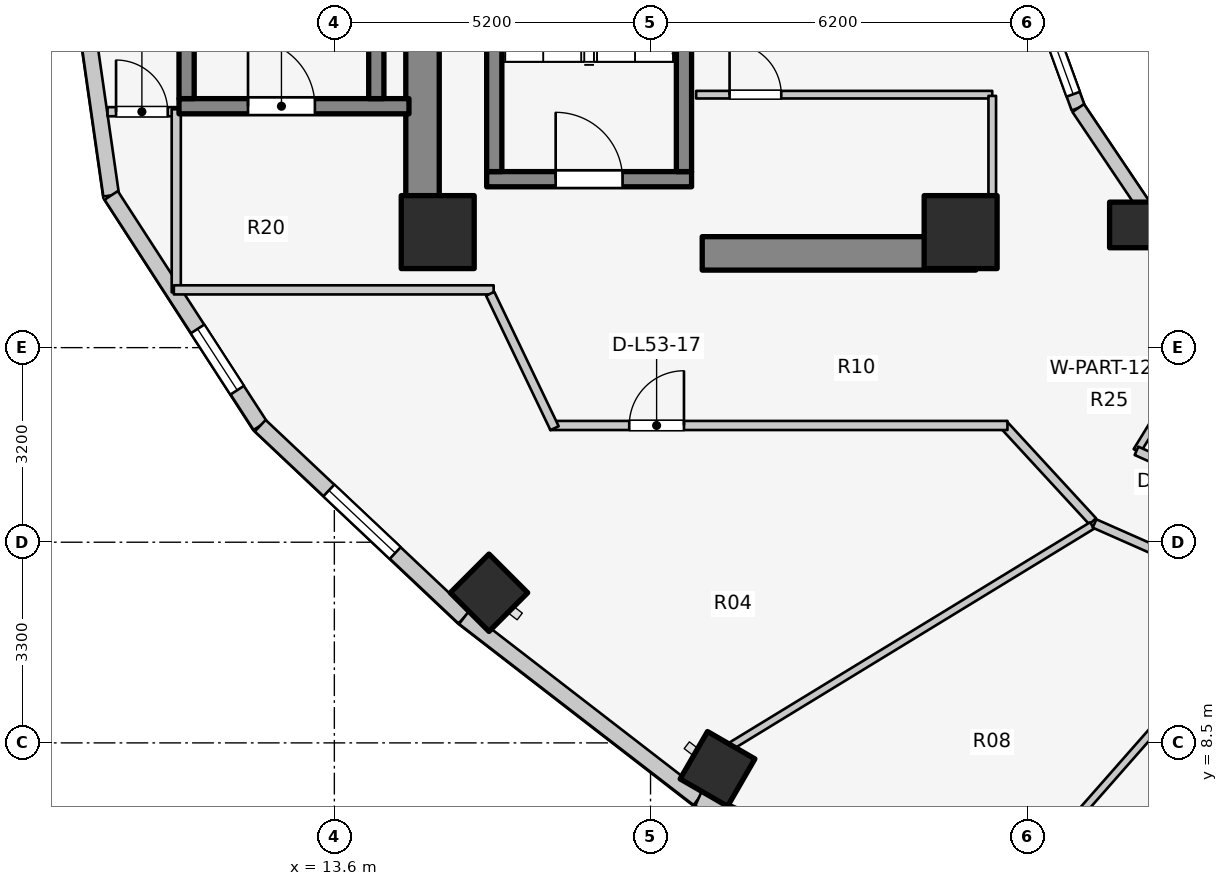
"""IFC4 building model, lengths in metres.
Left out: names, types, materials, properties, quantities, classifications, styles, units other than length and angle.
Written with IfcOpenShell. Run it as: python <this file> out.ifc"""

import sys

from ifc_helpers import new_model, si_unit, direction, frame, frame_2d, origin, origin_2d, place, context, subcontext, project, spatial, rectangle, extrude, element, fill, save


model = new_model("IFC4")
c1 = context("Model", 3, precision=1e-05, world=origin(), true_north=direction((0.0, 1.0)))
c2 = subcontext(c1, "Body", "Model", "MODEL_VIEW")
j1 = project(units=[si_unit("LENGTHUNIT", "METRE"), si_unit("PLANEANGLEUNIT", "RADIAN")], contexts=[c1])
p1 = place(None, origin())
s1 = spatial("IfcSite", under=j1, at=p1, CompositionType="ELEMENT")
p2 = place(p1, origin())
s2 = spatial("IfcBuilding", under=s1, at=p2, CompositionType="ELEMENT")
p3 = place(p2, frame((0.0, 0.0, 174.6)))
s3 = spatial("IfcBuildingStorey", under=s2, at=p3, CompositionType="ELEMENT", Elevation=174.6)
p4 = place(p3, frame((15.05, 17.05, 0.0), z_axis=(0.0, 0.0, 1.0), x_axis=(0.0, 1.0, 0.0)))
e1 = element("IfcWall", 1, at=p4, inside=s3, PredefinedType="SHEAR", context=c2, shape_type="SweptSolid", body=[
    extrude(rectangle(XDim=12.8, YDim=0.55, at=frame_2d((6.4, 0.0))), origin(), (0.0, 0.0, 1.0), 3.1),
])
p5 = place(p3, frame((19.65, 16.55, 0.0), z_axis=(0.0, 0.0, 1.0), x_axis=(1.0, 0.0, 0.0)))
e2 = element("IfcWall", 2, at=p5, inside=s3, PredefinedType="SHEAR", context=c2, shape_type="SweptSolid", body=[
    extrude(rectangle(XDim=4.5, YDim=0.55, at=frame_2d((2.25, 0.0))), origin(), (0.0, 0.0, 1.0), 3.1),
])
p6 = place(p3, frame((16.105, 17.77, 0.0), z_axis=(0.0, 0.0, 1.0), x_axis=(1.0, 0.0, 0.0)))
e3 = element("IfcWall", 3, at=p6, inside=s3, PredefinedType="SOLIDWALL", context=c2, shape_type="SweptSolid", body=[
    extrude(rectangle(XDim=3.37, YDim=0.25, at=frame_2d((1.685, 0.0))), origin(), (0.0, 0.0, 1.0), 3.1),
])
p7 = place(p6, frame((1.135, 0.0, 0.0)))
e4 = element("IfcOpeningElement", 4, at=p7, cuts=e3, PredefinedType="OPENING", context=c2, shape_type="SweptSolid", body=[
    extrude(rectangle(XDim=1.1, YDim=2.1, at=frame_2d((0.55, 1.05))), frame((0.0, 0.135, 0.0), z_axis=(0.0, -1.0, 0.0), x_axis=(1.0, 0.0, 0.0)), (0.0, 0.0, 1.0), 0.27),
])
for number, where, z_axis, x_axis in (
    (5, (16.23, 17.895, 0.0), (0.0, 0.0, 1.0), (0.0, 1.0, 0.0)),
    (6, (19.35, 17.895, 0.0), (0.0, 0.0, 1.0), (0.0, 1.0, 0.0)),
):
    element("IfcWall", number, at=place(p3, frame(where, z_axis=z_axis, x_axis=x_axis)), inside=s3, PredefinedType="SOLIDWALL", context=c2, shape_type="SweptSolid", body=[
        extrude(rectangle(XDim=7.81, YDim=0.25, at=frame_2d((3.905, 0.0))), origin(), (0.0, 0.0, 1.0), 3.1),
    ])
p8 = place(p3, frame((11.045, 18.97, 0.0), z_axis=(0.0, 0.0, 1.0), x_axis=(1.0, 0.0, 0.0)))
e7 = element("IfcWall", 7, at=p8, inside=s3, PredefinedType="SOLIDWALL", context=c2, shape_type="SweptSolid", body=[
    extrude(rectangle(XDim=3.782, YDim=0.25, at=frame_2d((1.891, 0.0))), origin(), (0.0, 0.0, 1.0), 3.1),
])
p9 = place(p8, frame((1.135, 0.0, 0.0)))
e8 = element("IfcOpeningElement", 8, at=p9, cuts=e7, PredefinedType="OPENING", context=c2, shape_type="SweptSolid", body=[
    extrude(rectangle(XDim=1.1, YDim=2.1, at=frame_2d((0.55, 1.05))), frame((0.0, 0.135, 0.0), z_axis=(0.0, -1.0, 0.0), x_axis=(1.0, 0.0, 0.0)), (0.0, 0.0, 1.0), 0.27),
])
for number, where, z_axis, x_axis in (
    (9, (11.17, 19.095, 0.0), (0.0, 0.0, 1.0), (0.0, 1.0, 0.0)),
    (10, (14.29, 19.095, 0.0), (0.0, 0.0, 1.0), (0.0, 1.0, 0.0)),
):
    element("IfcWall", number, at=place(p3, frame(where, z_axis=z_axis, x_axis=x_axis)), inside=s3, PredefinedType="SOLIDWALL", context=c2, shape_type="SweptSolid", body=[
        extrude(rectangle(XDim=7.81, YDim=0.25, at=frame_2d((3.905, 0.0))), origin(), (0.0, 0.0, 1.0), 3.1),
    ])
for number, where, z_axis, x_axis in (
    (11, (15.3, 16.9, 0.0), (0.0, 0.0, 1.0), (1.0, 0.0, 0.0)),
    (12, (23.9, 16.9, 0.0), (0.0, 0.0, 1.0), (1.0, 0.0, 0.0)),
):
    element("IfcColumn", number, at=place(p3, frame(where, z_axis=z_axis, x_axis=x_axis)), inside=s3, PredefinedType="COLUMN", context=c2, shape_type="SweptSolid", body=[
        extrude(rectangle(XDim=1.2, YDim=1.2, at=origin_2d()), origin(), (0.0, 0.0, 1.0), 3.1),
    ])
p10 = place(p3, frame((26.725, 17.018, 0.0), z_axis=(0.0, 0.0, 1.0), x_axis=(1.0, 0.0, 0.0)))
e13 = element("IfcColumn", 13, at=p10, inside=s3, PredefinedType="COLUMN", context=c2, shape_type="SweptSolid", body=[
    extrude(rectangle(XDim=0.75, YDim=0.75, at=origin_2d()), origin(), (0.0, 0.0, 1.0), 3.1),
])
for number, where, z_axis, x_axis in (
    (14, (16.143, 10.969, 0.0), (0.0, 0.0, 1.0), (-0.707, -0.707, 0.0)),
    (15, (19.902, 8.072, 0.0), (0.0, 0.0, 1.0), (-0.5, -0.866, 0.0)),
):
    element("IfcColumn", number, at=place(p3, frame(where, z_axis=z_axis, x_axis=x_axis)), inside=s3, PredefinedType="COLUMN", context=c2, shape_type="SweptSolid", body=[
        extrude(rectangle(XDim=0.9, YDim=0.9, at=origin_2d()), origin(), (0.0, 0.0, 1.0), 3.1),
    ])
p11 = place(p3, frame((25.123, 20.898, 0.0), z_axis=(0.0, 0.0, 1.0), x_axis=(0.341423187295, -0.93990968033, 0.0)))
e16 = element("IfcWall", 16, at=p11, inside=s3, PredefinedType="STANDARD", context=c2, shape_type="SweptSolid", body=[
    extrude(rectangle(XDim=2.084, YDim=0.23, at=frame_2d((1.042, 0.0))), origin(), (0.0, 0.0, 1.0), 2.84),
])
p12 = place(p11, frame((0.242, 0.0, 0.85)))
e17 = element("IfcOpeningElement", 17, at=p12, cuts=e16, PredefinedType="OPENING", context=c2, shape_type="SweptSolid", body=[
    extrude(rectangle(XDim=1.6, YDim=1.65, at=frame_2d((0.8, 0.825))), frame((0.0, 0.125, 0.0), z_axis=(0.0, -1.0, 0.0), x_axis=(1.0, 0.0, 0.0)), (0.0, 0.0, 1.0), 0.25),
])
p13 = place(p3, frame((25.834, 18.94, 0.0), z_axis=(0.0, 0.0, 1.0), x_axis=(0.558197800898, -0.829707909492, 0.0)))
e18 = element("IfcWall", 18, at=p13, inside=s3, PredefinedType="STANDARD", context=c2, shape_type="SweptSolid", body=[
    extrude(rectangle(XDim=2.027, YDim=0.23, at=frame_2d((1.013, 0.0))), origin(), (0.0, 0.0, 1.0), 2.16),
])
p14 = place(p3, frame((26.965, 17.258, 0.0), z_axis=(0.0, 0.0, 1.0), x_axis=(0.752576694707, -0.658504607869, 0.0)))
e19 = element("IfcWall", 19, at=p14, inside=s3, PredefinedType="STANDARD", context=c2, shape_type="SweptSolid", body=[
    extrude(rectangle(XDim=1.959, YDim=0.23, at=frame_2d((0.98, 0.0))), origin(), (0.0, 0.0, 1.0), 2.16),
])
p15 = place(p3, frame((9.14, 23.0, 0.0), z_axis=(0.0, 0.0, 1.0), x_axis=(0.142227632286, -0.989833976288, 0.0)))
e20 = element("IfcWall", 20, at=p15, inside=s3, PredefinedType="STANDARD", context=c2, shape_type="SweptSolid", body=[
    extrude(rectangle(XDim=5.553, YDim=0.26, at=frame_2d((2.776, 0.0))), origin(), (0.0, 0.0, 1.0), 2.85),
])
p16 = place(p15, frame((1.506, 0.0, 0.75)))
e21 = element("IfcOpeningElement", 21, at=p16, cuts=e20, PredefinedType="OPENING", context=c2, shape_type="SweptSolid", body=[
    extrude(rectangle(XDim=1.2, YDim=1.5, at=frame_2d((0.6, 0.75))), frame((0.0, 0.14, 0.0), z_axis=(0.0, -1.0, 0.0), x_axis=(1.0, 0.0, 0.0)), (0.0, 0.0, 1.0), 0.28),
])
p17 = place(p3, frame((9.93, 17.503, 0.0), z_axis=(0.0, 0.0, 1.0), x_axis=(0.543358984534, -0.839500454989, 0.0)))
e22 = element("IfcWall", 22, at=p17, inside=s3, PredefinedType="STANDARD", context=c2, shape_type="SweptSolid", body=[
    extrude(rectangle(XDim=4.511, YDim=0.26, at=frame_2d((2.256, 0.0))), origin(), (0.0, 0.0, 1.0), 2.85),
])
p18 = place(p17, frame((2.615, 0.0, 0.75)))
e23 = element("IfcOpeningElement", 23, at=p18, cuts=e22, PredefinedType="OPENING", context=c2, shape_type="SweptSolid", body=[
    extrude(rectangle(XDim=1.2, YDim=1.5, at=frame_2d((0.6, 0.75))), frame((0.0, 0.14, 0.0), z_axis=(0.0, -1.0, 0.0), x_axis=(1.0, 0.0, 0.0)), (0.0, 0.0, 1.0), 0.28),
])
p19 = place(p3, frame((12.381, 13.716, 0.0), z_axis=(0.0, 0.0, 1.0), x_axis=(0.727667301037, -0.68593024354, 0.0)))
e24 = element("IfcWall", 24, at=p19, inside=s3, PredefinedType="STANDARD", context=c2, shape_type="SweptSolid", body=[
    extrude(rectangle(XDim=4.604, YDim=0.26, at=frame_2d((2.302, 0.0))), origin(), (0.0, 0.0, 1.0), 2.85),
])
p20 = place(p19, frame((1.552, 0.0, 0.75)))
e25 = element("IfcOpeningElement", 25, at=p20, cuts=e24, PredefinedType="OPENING", context=c2, shape_type="SweptSolid", body=[
    extrude(rectangle(XDim=1.5, YDim=1.6, at=frame_2d((0.75, 0.8))), frame((0.0, 0.14, 0.0), z_axis=(0.0, -1.0, 0.0), x_axis=(1.0, 0.0, 0.0)), (0.0, 0.0, 1.0), 0.28),
])
p21 = place(p3, frame((15.731, 10.559, 0.0), z_axis=(0.0, 0.0, 1.0), x_axis=(0.791460185804, -0.611220724687, 0.0)))
e26 = element("IfcWall", 26, at=p21, inside=s3, PredefinedType="STANDARD", context=c2, shape_type="SweptSolid", body=[
    extrude(rectangle(XDim=4.872, YDim=0.26, at=frame_2d((2.436, 0.0))), origin(), (0.0, 0.0, 1.0), 2.85),
])
p22 = place(p3, frame((19.587, 7.581, 0.0), z_axis=(0.0, 0.0, 1.0), x_axis=(0.912353637112, -0.409403029847, 0.0)))
e27 = element("IfcWall", 27, at=p22, inside=s3, PredefinedType="STANDARD", context=c2, shape_type="SweptSolid", body=[
    extrude(rectangle(XDim=5.533, YDim=0.26, at=frame_2d((2.766, 0.0))), origin(), (0.0, 0.0, 1.0), 2.85),
])
p23 = place(p22, frame((1.566, 0.0, 0.75)))
e28 = element("IfcOpeningElement", 28, at=p23, cuts=e27, PredefinedType="OPENING", context=c2, shape_type="SweptSolid", body=[
    extrude(rectangle(XDim=2.4, YDim=1.7, at=frame_2d((1.2, 0.85))), frame((0.0, 0.14, 0.0), z_axis=(0.0, -1.0, 0.0), x_axis=(1.0, 0.0, 0.0)), (0.0, 0.0, 1.0), 0.28),
])
p24 = place(p3, frame((19.55, 19.16, 0.0), z_axis=(0.0, 0.0, 1.0), x_axis=(1.0, 0.0, 0.0)))
e29 = element("IfcWall", 29, at=p24, inside=s3, PredefinedType="PARTITIONING", context=c2, shape_type="SweptSolid", body=[
    extrude(rectangle(XDim=4.87, YDim=0.125, at=frame_2d((2.435, 0.0))), origin(), (0.0, 0.0, 1.0), 2.12),
])
p25 = place(p24, frame((0.55, 0.0, 0.0)))
e30 = element("IfcOpeningElement", 30, at=p25, cuts=e29, PredefinedType="OPENING", context=c2, shape_type="SweptSolid", body=[
    extrude(rectangle(XDim=0.85, YDim=2.05, at=frame_2d((0.425, 1.025))), frame((0.0, 0.073, 0.0), z_axis=(0.0, -1.0, 0.0), x_axis=(1.0, 0.0, 0.0)), (0.0, 0.0, 1.0), 0.145),
])
p26 = place(p3, frame((24.42, 17.1, 0.0), z_axis=(0.0, 0.0, 1.0), x_axis=(0.0, 1.0, 0.0)))
e31 = element("IfcWall", 31, at=p26, inside=s3, PredefinedType="PARTITIONING", context=c2, shape_type="SweptSolid", body=[
    extrude(rectangle(XDim=2.04, YDim=0.125, at=frame_2d((1.02, 0.0))), origin(), (0.0, 0.0, 1.0), 2.232),
])
p27 = place(p3, frame((9.87, 18.88, 0.0), z_axis=(0.0, 0.0, 1.0), x_axis=(1.0, 0.0, 0.0)))
e32 = element("IfcWall", 32, at=p27, inside=s3, PredefinedType="PARTITIONING", context=c2, shape_type="SweptSolid", body=[
    extrude(rectangle(XDim=1.17, YDim=0.15, at=frame_2d((0.585, 0.0))), origin(), (0.0, 0.0, 1.0), 2.855),
])
p28 = place(p27, frame((0.14, 0.0, 0.0)))
e33 = element("IfcOpeningElement", 33, at=p28, cuts=e32, PredefinedType="OPENING", context=c2, shape_type="SweptSolid", body=[
    extrude(rectangle(XDim=0.85, YDim=2.05, at=frame_2d((0.425, 1.025))), frame((0.0, 0.085, 0.0), z_axis=(0.0, -1.0, 0.0), x_axis=(1.0, 0.0, 0.0)), (0.0, 0.0, 1.0), 0.17),
])
p29 = place(p3, frame((11.0, 15.91, 0.0), z_axis=(0.0, 0.0, 1.0), x_axis=(0.0, 1.0, 0.0)))
e34 = element("IfcWall", 34, at=p29, inside=s3, PredefinedType="PARTITIONING", context=c2, shape_type="SweptSolid", body=[
    extrude(rectangle(XDim=3.01, YDim=0.15, at=frame_2d((1.505, 0.0))), origin(), (0.0, 0.0, 1.0), 2.855),
])
p30 = place(p3, frame((10.96, 15.95, 0.0), z_axis=(0.0, 0.0, 1.0), x_axis=(1.0, 0.0, 0.0)))
e35 = element("IfcWall", 35, at=p30, inside=s3, PredefinedType="PARTITIONING", context=c2, shape_type="SweptSolid", body=[
    extrude(rectangle(XDim=5.26, YDim=0.15, at=frame_2d((2.63, 0.0))), origin(), (0.0, 0.0, 1.0), 2.22),
])
p31 = place(p3, frame((26.072, 12.144, 0.0), z_axis=(0.0, 0.0, 1.0), x_axis=(-0.677579737957, 0.735449317567, 0.0)))
e36 = element("IfcWall", 36, at=p31, inside=s3, PredefinedType="PARTITIONING", context=c2, shape_type="SweptSolid", body=[
    extrude(rectangle(XDim=2.173, YDim=0.15, at=frame_2d((1.086, 0.0))), origin(), (0.0, 0.0, 1.0), 2.299),
])
p32 = place(p3, frame((17.15, 13.72, 0.0), z_axis=(0.0, 0.0, 1.0), x_axis=(1.0, 0.0, 0.0)))
e37 = element("IfcWall", 37, at=p32, inside=s3, PredefinedType="PARTITIONING", context=c2, shape_type="SweptSolid", body=[
    extrude(rectangle(XDim=7.52, YDim=0.15, at=frame_2d((3.76, 0.0))), origin(), (0.0, 0.0, 1.0), 2.299),
])
p33 = place(p32, frame((1.3, 0.0, 0.0)))
e38 = element("IfcOpeningElement", 38, at=p33, cuts=e37, PredefinedType="OPENING", context=c2, shape_type="SweptSolid", body=[
    extrude(rectangle(XDim=0.9, YDim=2.1, at=frame_2d((0.45, 1.05))), frame((0.0, 0.085, 0.0), z_axis=(0.0, -1.0, 0.0), x_axis=(1.0, 0.0, 0.0)), (0.0, 0.0, 1.0), 0.17),
])
p34 = place(p3, frame((17.222, 13.675, 0.0), z_axis=(0.0, 0.0, 1.0), x_axis=(-0.431973389813, 0.901886351207, 0.0)))
e39 = element("IfcWall", 39, at=p34, inside=s3, PredefinedType="PARTITIONING", context=c2, shape_type="SweptSolid", body=[
    extrude(rectangle(XDim=2.452, YDim=0.15, at=frame_2d((1.226, 0.0))), origin(), (0.0, 0.0, 1.0), 2.855),
])
p35 = place(p3, frame((28.45, 15.985, 0.0), z_axis=(0.0, 0.0, 1.0), x_axis=(-0.523587550846, -0.851971875474, 0.0)))
e40 = element("IfcWall", 40, at=p35, inside=s3, PredefinedType="PARTITIONING", context=c2, shape_type="SweptSolid", body=[
    extrude(rectangle(XDim=3.153, YDim=0.125, at=frame_2d((1.577, 0.0))), origin(), (0.0, 0.0, 1.0), 2.299),
])
p36 = place(p3, frame((26.793, 13.303, 0.0), z_axis=(0.0, 0.0, 1.0), x_axis=(0.913145536541, -0.407633694749, 0.0)))
e41 = element("IfcWall", 41, at=p36, inside=s3, PredefinedType="PARTITIONING", context=c2, shape_type="SweptSolid", body=[
    extrude(rectangle(XDim=2.756, YDim=0.15, at=frame_2d((1.378, 0.0))), origin(), (0.0, 0.0, 1.0), 2.299),
])
p37 = place(p3, frame((26.062, 12.075, 0.0), z_axis=(0.0, 0.0, 1.0), x_axis=(-0.853440334679, -0.521190555501, 0.0)))
e42 = element("IfcWall", 42, at=p37, inside=s3, PredefinedType="PARTITIONING", context=c2, shape_type="SweptSolid", body=[
    extrude(rectangle(XDim=6.966, YDim=0.125, at=frame_2d((3.483, 0.0))), origin(), (0.0, 0.0, 1.0), 2.299),
])
p38 = place(p3, frame((28.914, 10.805, 0.0), z_axis=(0.0, 0.0, 1.0), x_axis=(-0.660581320981, -0.750754499401, 0.0)))
e43 = element("IfcWall", 43, at=p38, inside=s3, PredefinedType="PARTITIONING", context=c2, shape_type="SweptSolid", body=[
    extrude(rectangle(XDim=6.027, YDim=0.125, at=frame_2d((3.013, 0.0))), origin(), (0.0, 0.0, 1.0), 2.299),
])
p39 = place(p3, frame((26.102, 12.108, 0.0), z_axis=(0.0, 0.0, 1.0), x_axis=(0.914519212393, -0.40454247016, 0.0)))
e44 = element("IfcWall", 44, at=p39, inside=s3, PredefinedType="PARTITIONING", context=c2, shape_type="SweptSolid", body=[
    extrude(rectangle(XDim=3.124, YDim=0.15, at=frame_2d((1.562, 0.0))), origin(), (0.0, 0.0, 1.0), 2.299),
])
p40 = place(p39, frame((1.062, 0.0, 0.0)))
e45 = element("IfcOpeningElement", 45, at=p40, cuts=e44, PredefinedType="OPENING", context=c2, shape_type="SweptSolid", body=[
    extrude(rectangle(XDim=1.0, YDim=2.1, at=frame_2d((0.5, 1.05))), frame((0.0, 0.085, 0.0), z_axis=(0.0, -1.0, 0.0), x_axis=(1.0, 0.0, 0.0)), (0.0, 0.0, 1.0), 0.17),
])
p41 = place(p12, origin())
e46 = element("IfcWindow", 46, at=p41, inside=s3, PartitioningType="SINGLE_PANEL", PredefinedType="WINDOW", context=c2, shape_type="SweptSolid", body=[
    extrude(rectangle(XDim=1.6, YDim=1.65, at=frame_2d((0.8, 0.825))), frame((0.0, 0.03, 0.0), z_axis=(0.0, -1.0, 0.0), x_axis=(1.0, 0.0, 0.0)), (0.0, 0.0, 1.0), 0.06),
])
fill(e17, e46)
p42 = place(p18, origin())
e47 = element("IfcWindow", 47, at=p42, inside=s3, PartitioningType="SINGLE_PANEL", PredefinedType="WINDOW", context=c2, shape_type="SweptSolid", body=[
    extrude(rectangle(XDim=1.2, YDim=1.5, at=frame_2d((0.6, 0.75))), frame((0.0, 0.03, 0.0), z_axis=(0.0, -1.0, 0.0), x_axis=(1.0, 0.0, 0.0)), (0.0, 0.0, 1.0), 0.06),
])
fill(e23, e47)
p43 = place(p20, origin())
e48 = element("IfcWindow", 48, at=p43, inside=s3, PartitioningType="SINGLE_PANEL", PredefinedType="WINDOW", context=c2, shape_type="SweptSolid", body=[
    extrude(rectangle(XDim=1.5, YDim=1.6, at=frame_2d((0.75, 0.8))), frame((0.0, 0.03, 0.0), z_axis=(0.0, -1.0, 0.0), x_axis=(1.0, 0.0, 0.0)), (0.0, 0.0, 1.0), 0.06),
])
fill(e25, e48)
p44 = place(p7, origin())
e49 = element("IfcDoor", 49, at=p44, inside=s3, OperationType="SINGLE_SWING_LEFT", PredefinedType="DOOR", context=c2, shape_type="SweptSolid", body=[
    extrude(rectangle(XDim=1.1, YDim=2.1, at=frame_2d((0.55, 1.05))), frame((0.0, 0.025, 0.0), z_axis=(0.0, -1.0, 0.0), x_axis=(1.0, 0.0, 0.0)), (0.0, 0.0, 1.0), 0.05),
])
fill(e4, e49)
p45 = place(p9, origin())
e50 = element("IfcDoor", 50, at=p45, inside=s3, OperationType="SINGLE_SWING_LEFT", PredefinedType="DOOR", context=c2, shape_type="SweptSolid", body=[
    extrude(rectangle(XDim=1.1, YDim=2.1, at=frame_2d((0.55, 1.05))), frame((0.0, 0.025, 0.0), z_axis=(0.0, -1.0, 0.0), x_axis=(1.0, 0.0, 0.0)), (0.0, 0.0, 1.0), 0.05),
])
fill(e8, e50)
p46 = place(p25, origin())
e51 = element("IfcDoor", 51, at=p46, inside=s3, OperationType="SINGLE_SWING_LEFT", PredefinedType="DOOR", context=c2, shape_type="SweptSolid", body=[
    extrude(rectangle(XDim=0.85, YDim=2.05, at=frame_2d((0.425, 1.025))), frame((0.0, 0.025, 0.0), z_axis=(0.0, -1.0, 0.0), x_axis=(1.0, 0.0, 0.0)), (0.0, 0.0, 1.0), 0.05),
])
fill(e30, e51)
p47 = place(p28, origin())
e52 = element("IfcDoor", 52, at=p47, inside=s3, OperationType="SINGLE_SWING_LEFT", PredefinedType="DOOR", context=c2, shape_type="SweptSolid", body=[
    extrude(rectangle(XDim=0.85, YDim=2.05, at=frame_2d((0.425, 1.025))), frame((0.0, 0.025, 0.0), z_axis=(0.0, -1.0, 0.0), x_axis=(1.0, 0.0, 0.0)), (0.0, 0.0, 1.0), 0.05),
])
fill(e33, e52)
p48 = place(p33, origin())
e53 = element("IfcDoor", 53, at=p48, inside=s3, OperationType="SINGLE_SWING_RIGHT", PredefinedType="DOOR", context=c2, shape_type="SweptSolid", body=[
    extrude(rectangle(XDim=0.9, YDim=2.1, at=frame_2d((0.45, 1.05))), frame((0.0, 0.025, 0.0), z_axis=(0.0, -1.0, 0.0), x_axis=(1.0, 0.0, 0.0)), (0.0, 0.0, 1.0), 0.05),
])
fill(e38, e53)
save(model, sys.argv[1])
